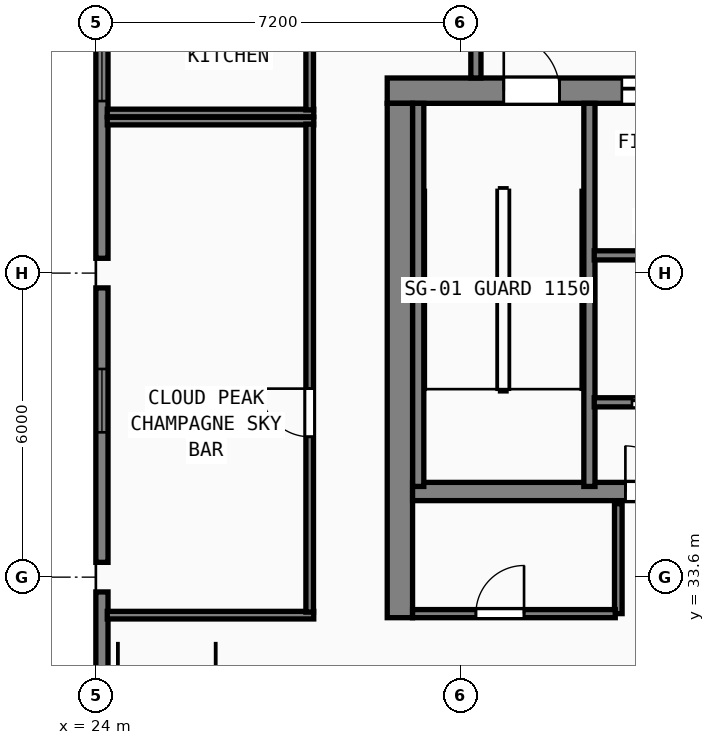
"""IFC4 building model, lengths in metres.
Left out: names, types, materials, properties, quantities, classifications, styles, units other than length and angle.
Written with IfcOpenShell. Run it as: python <this file> out.ifc"""

import sys

from ifc_helpers import new_model, si_unit, direction, frame, frame_2d, origin, origin_2d, place, context, subcontext, project, spatial, rectangle, hollow_rectangle, extrude, element, fill, save


model = new_model("IFC4")
c1 = context("Model", 3, precision=1e-05, world=origin(), true_north=direction((0.0, 1.0)))
c2 = subcontext(c1, "Body", "Model", "MODEL_VIEW")
j1 = project(units=[si_unit("LENGTHUNIT", "METRE"), si_unit("PLANEANGLEUNIT", "RADIAN")], contexts=[c1])
p1 = place(None, origin())
s1 = spatial("IfcSite", under=j1, at=p1, CompositionType="ELEMENT")
p2 = place(p1, origin())
s2 = spatial("IfcBuilding", under=s1, at=p2, CompositionType="ELEMENT")
p3 = place(p2, frame((0.0, 0.0, 323.2)))
s3 = spatial("IfcBuildingStorey", under=s2, at=p3, CompositionType="ELEMENT", Elevation=323.2)
p4 = place(p3, frame((29.75, 43.2, 0.0), z_axis=(0.0, 0.0, 1.0), x_axis=(1.0, 0.0, 0.0)))
e1 = element("IfcWall", 1, at=p4, inside=s3, PredefinedType="SHEAR", context=c2, shape_type="SweptSolid", body=[
    extrude(rectangle(XDim=17.3, YDim=0.5, at=frame_2d((8.65, 0.0))), origin(), (0.0, 0.0, 1.0), 4.75),
])
p5 = place(p4, frame((2.3, 0.0, 0.0)))
e2 = element("IfcOpeningElement", 2, at=p5, cuts=e1, PredefinedType="OPENING", context=c2, shape_type="SweptSolid", body=[
    extrude(rectangle(XDim=1.1, YDim=2.15, at=frame_2d((0.55, 1.075))), frame((0.0, 0.26, 0.0), z_axis=(0.0, -1.0, 0.0), x_axis=(1.0, 0.0, 0.0)), (0.0, 0.0, 1.0), 0.52),
])
p6 = place(p4, frame((7.41, 0.0, 0.0)))
e3 = element("IfcOpeningElement", 3, at=p6, cuts=e1, PredefinedType="OPENING", context=c2, shape_type="SweptSolid", body=[
    extrude(rectangle(XDim=1.1, YDim=2.15, at=frame_2d((0.55, 1.075))), frame((0.0, 0.26, 0.0), z_axis=(0.0, -1.0, 0.0), x_axis=(1.0, 0.0, 0.0)), (0.0, 0.0, 1.0), 0.52),
])
p7 = place(p4, frame((13.5, 0.0, 0.0)))
e4 = element("IfcOpeningElement", 4, at=p7, cuts=e1, PredefinedType="OPENING", context=c2, shape_type="SweptSolid", body=[
    extrude(rectangle(XDim=1.1, YDim=2.15, at=frame_2d((0.55, 1.075))), frame((0.0, 0.26, 0.0), z_axis=(0.0, -1.0, 0.0), x_axis=(1.0, 0.0, 0.0)), (0.0, 0.0, 1.0), 0.52),
])
p8 = place(p4, frame((4.63, 0.0, 0.0)))
e5 = element("IfcOpeningElement", 5, at=p8, cuts=e1, PredefinedType="OPENING", context=c2, shape_type="SweptSolid", body=[
    extrude(rectangle(XDim=1.1, YDim=2.2, at=frame_2d((0.55, 1.1))), frame((0.0, 0.26, 0.0), z_axis=(0.0, -1.0, 0.0), x_axis=(1.0, 0.0, 0.0)), (0.0, 0.0, 1.0), 0.52),
])
p9 = place(p4, frame((10.99, 0.0, 0.0)))
e6 = element("IfcOpeningElement", 6, at=p9, cuts=e1, PredefinedType="OPENING", context=c2, shape_type="SweptSolid", body=[
    extrude(rectangle(XDim=1.1, YDim=2.2, at=frame_2d((0.55, 1.1))), frame((0.0, 0.26, 0.0), z_axis=(0.0, -1.0, 0.0), x_axis=(1.0, 0.0, 0.0)), (0.0, 0.0, 1.0), 0.52),
])
p10 = place(p3, frame((30.0, 32.8, 0.0), z_axis=(0.0, 0.0, 1.0), x_axis=(0.0, 1.0, 0.0)))
e7 = element("IfcWall", 7, at=p10, inside=s3, PredefinedType="SHEAR", context=c2, shape_type="SweptSolid", body=[
    extrude(rectangle(XDim=10.15, YDim=0.5, at=frame_2d((5.075, 0.0))), origin(), (0.0, 0.0, 1.0), 4.75),
])
p11 = place(p3, frame((30.25, 35.29, 0.0), z_axis=(0.0, 0.0, 1.0), x_axis=(1.0, 0.0, 0.0)))
e8 = element("IfcWall", 8, at=p11, inside=s3, PredefinedType="SHEAR", context=c2, shape_type="SweptSolid", body=[
    extrude(rectangle(XDim=16.3, YDim=0.36, at=frame_2d((8.15, 0.0))), origin(), (0.0, 0.0, 1.0), 4.75),
])
p12 = place(p11, frame((5.1, 0.0, 0.0), z_axis=(0.0, 0.0, 1.0), x_axis=(-1.0, 0.0, 0.0)))
e9 = element("IfcOpeningElement", 9, at=p12, cuts=e8, PredefinedType="OPENING", context=c2, shape_type="SweptSolid", body=[
    extrude(rectangle(XDim=0.9, YDim=2.1, at=frame_2d((0.45, 1.05))), frame((0.0, 0.19, 0.0), z_axis=(0.0, -1.0, 0.0), x_axis=(1.0, 0.0, 0.0)), (0.0, 0.0, 1.0), 0.38),
])
p13 = place(p11, frame((12.16, 0.0, 0.0), z_axis=(0.0, 0.0, 1.0), x_axis=(-1.0, 0.0, 0.0)))
e10 = element("IfcOpeningElement", 10, at=p13, cuts=e8, PredefinedType="OPENING", context=c2, shape_type="SweptSolid", body=[
    extrude(rectangle(XDim=0.9, YDim=2.1, at=frame_2d((0.45, 1.05))), frame((0.0, 0.19, 0.0), z_axis=(0.0, -1.0, 0.0), x_axis=(1.0, 0.0, 0.0)), (0.0, 0.0, 1.0), 0.38),
])
for number, where, z_axis, x_axis in (
    (11, (30.362, 35.39, 0.0), (0.0, 0.0, 1.0), (0.0, 1.0, 0.0)),
    (12, (33.74, 35.39, 0.0), (0.0, 0.0, 1.0), (0.0, 1.0, 0.0)),
):
    element("IfcWall", number, at=place(p3, frame(where, z_axis=z_axis, x_axis=x_axis)), inside=s3, PredefinedType="SHEAR", context=c2, shape_type="SweptSolid", body=[
        extrude(rectangle(XDim=7.56, YDim=0.22, at=frame_2d((3.78, 0.0))), origin(), (0.0, 0.0, 1.0), 4.75),
    ])
for number, where, z_axis, x_axis in (
    (13, (24.0, 33.6, 0.0), (0.0, 0.0, 1.0), (1.0, 0.0, 0.0)),
    (14, (24.0, 39.6, 0.0), (0.0, 0.0, 1.0), (1.0, 0.0, 0.0)),
):
    element("IfcColumn", number, at=place(p3, frame(where, z_axis=z_axis, x_axis=x_axis)), inside=s3, PredefinedType="COLUMN", context=c2, shape_type="SweptSolid", body=[
        extrude(hollow_rectangle(XDim=0.6, YDim=0.6, WallThickness=0.024, at=origin_2d()), origin(), (0.0, 0.0, 1.0), 5.0),
    ])
p14 = place(p3, frame((24.12, 45.308, 0.0), z_axis=(0.0, 0.0, 1.0), x_axis=(0.0, -1.0, 0.0)))
e15 = element("IfcWall", 15, at=p14, inside=s3, PredefinedType="SOLIDWALL", context=c2, shape_type="SweptSolid", body=[
    extrude(rectangle(XDim=5.416, YDim=0.24, at=frame_2d((2.708, 0.0))), origin(), (0.0, 0.0, 1.0), 4.75),
])
p15 = place(p14, frame((1.063, 0.0, 0.85)))
e16 = element("IfcOpeningElement", 16, at=p15, cuts=e15, PredefinedType="OPENING", context=c2, shape_type="SweptSolid", body=[
    extrude(rectangle(XDim=1.25, YDim=1.95, at=frame_2d((0.625, 0.975))), frame((0.0, 0.13, 0.0), z_axis=(0.0, -1.0, 0.0), x_axis=(1.0, 0.0, 0.0)), (0.0, 0.0, 1.0), 0.26),
])
p16 = place(p3, frame((24.12, 39.308, 0.0), z_axis=(0.0, 0.0, 1.0), x_axis=(0.0, -1.0, 0.0)))
e17 = element("IfcWall", 17, at=p16, inside=s3, PredefinedType="SOLIDWALL", context=c2, shape_type="SweptSolid", body=[
    extrude(rectangle(XDim=5.416, YDim=0.24, at=frame_2d((2.708, 0.0))), origin(), (0.0, 0.0, 1.0), 4.75),
])
p17 = place(p16, frame((1.6, 0.0, 0.85)))
e18 = element("IfcOpeningElement", 18, at=p17, cuts=e17, PredefinedType="OPENING", context=c2, shape_type="SweptSolid", body=[
    extrude(rectangle(XDim=1.25, YDim=1.95, at=frame_2d((0.625, 0.975))), frame((0.0, 0.13, 0.0), z_axis=(0.0, -1.0, 0.0), x_axis=(1.0, 0.0, 0.0)), (0.0, 0.0, 1.0), 0.26),
])
p18 = place(p3, frame((24.12, 33.308, 0.0), z_axis=(0.0, 0.0, 1.0), x_axis=(0.0, -1.0, 0.0)))
e19 = element("IfcWall", 19, at=p18, inside=s3, PredefinedType="SOLIDWALL", context=c2, shape_type="SweptSolid", body=[
    extrude(rectangle(XDim=5.416, YDim=0.24, at=frame_2d((2.708, 0.0))), origin(), (0.0, 0.0, 1.0), 4.75),
])
p19 = place(p18, frame((1.6, 0.0, 0.85)))
e20 = element("IfcOpeningElement", 20, at=p19, cuts=e19, PredefinedType="OPENING", context=c2, shape_type="SweptSolid", body=[
    extrude(rectangle(XDim=1.25, YDim=1.95, at=frame_2d((0.625, 0.975))), frame((0.0, 0.13, 0.0), z_axis=(0.0, -1.0, 0.0), x_axis=(1.0, 0.0, 0.0)), (0.0, 0.0, 1.0), 0.26),
])
p20 = place(p3, frame((31.5, 43.45, 0.0), z_axis=(0.0, 0.0, 1.0), x_axis=(0.0, 1.0, 0.0)))
e21 = element("IfcWall", 21, at=p20, inside=s3, PredefinedType="SOLIDWALL", context=c2, shape_type="SweptSolid", body=[
    extrude(rectangle(XDim=2.445, YDim=0.2, at=frame_2d((1.223, 0.0))), origin(), (0.0, 0.0, 1.0), 4.75),
])
p21 = place(p20, frame((1.8, 0.0, 0.0), z_axis=(0.0, 0.0, 1.0), x_axis=(-1.0, 0.0, 0.0)))
e22 = element("IfcOpeningElement", 22, at=p21, cuts=e21, PredefinedType="OPENING", context=c2, shape_type="SweptSolid", body=[
    extrude(rectangle(XDim=1.1, YDim=2.15, at=frame_2d((0.55, 1.075))), frame((0.0, 0.11, 0.0), z_axis=(0.0, -1.0, 0.0), x_axis=(1.0, 0.0, 0.0)), (0.0, 0.0, 1.0), 0.22),
])
p22 = place(p3, frame((33.835, 39.95, 0.0), z_axis=(0.0, 0.0, 1.0), x_axis=(1.0, 0.0, 0.0)))
e23 = element("IfcWall", 23, at=p22, inside=s3, PredefinedType="SOLIDWALL", context=c2, shape_type="SweptSolid", body=[
    extrude(rectangle(XDim=2.77, YDim=0.18, at=frame_2d((1.385, 0.0))), origin(), (0.0, 0.0, 1.0), 4.75),
])
p23 = place(p3, frame((33.835, 37.05, 0.0), z_axis=(0.0, 0.0, 1.0), x_axis=(1.0, 0.0, 0.0)))
e24 = element("IfcWall", 24, at=p23, inside=s3, PredefinedType="SOLIDWALL", context=c2, shape_type="SweptSolid", body=[
    extrude(rectangle(XDim=2.77, YDim=0.18, at=frame_2d((1.385, 0.0))), origin(), (0.0, 0.0, 1.0), 4.75),
])
p24 = place(p23, frame((1.945, 0.0, 0.0), z_axis=(0.0, 0.0, 1.0), x_axis=(-1.0, 0.0, 0.0)))
e25 = element("IfcOpeningElement", 25, at=p24, cuts=e24, PredefinedType="OPENING", context=c2, shape_type="SweptSolid", body=[
    extrude(rectangle(XDim=1.2, YDim=2.2, at=frame_2d((0.6, 1.1))), frame((0.0, 0.1, 0.0), z_axis=(0.0, -1.0, 0.0), x_axis=(1.0, 0.0, 0.0)), (0.0, 0.0, 1.0), 0.2),
])
p25 = place(p3, frame((34.31, 32.88, 0.0), z_axis=(0.0, 0.0, 1.0), x_axis=(0.0, 1.0, 0.0)))
e26 = element("IfcWall", 26, at=p25, inside=s3, PredefinedType="SOLIDWALL", context=c2, shape_type="SweptSolid", body=[
    extrude(rectangle(XDim=2.17, YDim=0.15, at=frame_2d((1.085, 0.0))), origin(), (0.0, 0.0, 1.0), 4.75),
])
p26 = place(p3, frame((30.25, 32.88, 0.0), z_axis=(0.0, 0.0, 1.0), x_axis=(1.0, 0.0, 0.0)))
e27 = element("IfcWall", 27, at=p26, inside=s3, PredefinedType="SOLIDWALL", context=c2, shape_type="SweptSolid", body=[
    extrude(rectangle(XDim=4.0, YDim=0.16, at=frame_2d((2.0, 0.0))), origin(), (0.0, 0.0, 1.0), 4.75),
])
p27 = place(p26, frame((2.2, 0.0, 0.0), z_axis=(0.0, 0.0, 1.0), x_axis=(-1.0, 0.0, 0.0)))
e28 = element("IfcOpeningElement", 28, at=p27, cuts=e27, PredefinedType="OPENING", context=c2, shape_type="SweptSolid", body=[
    extrude(rectangle(XDim=0.95, YDim=2.12, at=frame_2d((0.475, 1.06))), frame((0.0, 0.09, 0.0), z_axis=(0.0, -1.0, 0.0), x_axis=(1.0, 0.0, 0.0)), (0.0, 0.0, 1.0), 0.18),
])
for number, where, z_axis, x_axis in (
    (29, (24.225, 42.6, 0.0), (0.0, 0.0, 1.0), (1.0, 0.0, 0.0)),
    (30, (24.225, 32.85, 0.0), (0.0, 0.0, 1.0), (1.0, 0.0, 0.0)),
):
    element("IfcWall", number, at=place(p3, frame(where, z_axis=z_axis, x_axis=x_axis)), inside=s3, PredefinedType="PARTITIONING", context=c2, shape_type="SweptSolid", body=[
        extrude(rectangle(XDim=4.075, YDim=0.15, at=frame_2d((2.038, 0.0))), origin(), (0.0, 0.0, 1.0), 4.75),
    ])
p28 = place(p3, frame((28.22, 32.91, 0.0), z_axis=(0.0, 0.0, 1.0), x_axis=(0.0, 1.0, 0.0)))
e31 = element("IfcWall", 31, at=p28, inside=s3, PredefinedType="PARTITIONING", context=c2, shape_type="SweptSolid", body=[
    extrude(rectangle(XDim=9.63, YDim=0.15, at=frame_2d((4.815, 0.0))), origin(), (0.0, 0.0, 1.0), 4.75),
])
p29 = place(p28, frame((4.41, 0.0, 0.0), z_axis=(0.0, 0.0, 1.0), x_axis=(-1.0, 0.0, 0.0)))
e32 = element("IfcOpeningElement", 32, at=p29, cuts=e31, PredefinedType="OPENING", context=c2, shape_type="SweptSolid", body=[
    extrude(rectangle(XDim=0.95, YDim=2.12, at=frame_2d((0.475, 1.06))), frame((0.0, 0.085, 0.0), z_axis=(0.0, -1.0, 0.0), x_axis=(1.0, 0.0, 0.0)), (0.0, 0.0, 1.0), 0.17),
])
p30 = place(p3, frame((24.225, 42.76, 0.0), z_axis=(0.0, 0.0, 1.0), x_axis=(1.0, 0.0, 0.0)))
e33 = element("IfcWall", 33, at=p30, inside=s3, PredefinedType="PARTITIONING", context=c2, shape_type="SweptSolid", body=[
    extrude(rectangle(XDim=4.075, YDim=0.15, at=frame_2d((2.038, 0.0))), origin(), (0.0, 0.0, 1.0), 4.75),
])
p31 = place(p3, frame((28.22, 42.82, 0.0), z_axis=(0.0, 0.0, 1.0), x_axis=(0.0, 1.0, 0.0)))
e34 = element("IfcWall", 34, at=p31, inside=s3, PredefinedType="PARTITIONING", context=c2, shape_type="SweptSolid", body=[
    extrude(rectangle(XDim=4.78, YDim=0.15, at=frame_2d((2.39, 0.0))), origin(), (0.0, 0.0, 1.0), 4.75),
])
p32 = place(p31, frame((2.61, 0.0, 0.0), z_axis=(0.0, 0.0, 1.0), x_axis=(-1.0, 0.0, 0.0)))
e35 = element("IfcOpeningElement", 35, at=p32, cuts=e34, PredefinedType="OPENING", context=c2, shape_type="SweptSolid", body=[
    extrude(rectangle(XDim=0.95, YDim=2.12, at=frame_2d((0.475, 1.06))), frame((0.0, 0.085, 0.0), z_axis=(0.0, -1.0, 0.0), x_axis=(1.0, 0.0, 0.0)), (0.0, 0.0, 1.0), 0.17),
])
p33 = place(p15, origin())
e36 = element("IfcWindow", 36, at=p33, inside=s3, PartitioningType="SINGLE_PANEL", PredefinedType="WINDOW", context=c2, shape_type="SweptSolid", body=[
    extrude(rectangle(XDim=1.25, YDim=1.95, at=frame_2d((0.625, 0.975))), frame((0.0, 0.03, 0.0), z_axis=(0.0, -1.0, 0.0), x_axis=(1.0, 0.0, 0.0)), (0.0, 0.0, 1.0), 0.06),
])
fill(e16, e36)
p34 = place(p17, origin())
e37 = element("IfcWindow", 37, at=p34, inside=s3, PartitioningType="SINGLE_PANEL", PredefinedType="WINDOW", context=c2, shape_type="SweptSolid", body=[
    extrude(rectangle(XDim=1.25, YDim=1.95, at=frame_2d((0.625, 0.975))), frame((0.0, 0.03, 0.0), z_axis=(0.0, -1.0, 0.0), x_axis=(1.0, 0.0, 0.0)), (0.0, 0.0, 1.0), 0.06),
])
fill(e18, e37)
p35 = place(p5, origin())
e38 = element("IfcDoor", 38, at=p35, inside=s3, OperationType="SINGLE_SWING_LEFT", PredefinedType="DOOR", context=c2, shape_type="SweptSolid", body=[
    extrude(rectangle(XDim=1.1, YDim=2.15, at=frame_2d((0.55, 1.075))), frame((0.0, 0.185, 0.0), z_axis=(0.0, -1.0, 0.0), x_axis=(1.0, 0.0, 0.0)), (0.0, 0.0, 1.0), 0.05),
])
fill(e2, e38)
p36 = place(p8, origin())
e39 = element("IfcDoor", 39, at=p36, inside=s3, OperationType="SLIDING_TO_LEFT", PredefinedType="DOOR", context=c2, shape_type="SweptSolid", body=[
    extrude(rectangle(XDim=1.1, YDim=2.2, at=frame_2d((0.55, 1.1))), frame((0.0, 0.185, 0.0), z_axis=(0.0, -1.0, 0.0), x_axis=(1.0, 0.0, 0.0)), (0.0, 0.0, 1.0), 0.05),
])
fill(e5, e39)
p37 = place(p24, origin())
e40 = element("IfcDoor", 40, at=p37, inside=s3, OperationType="SLIDING_TO_RIGHT", PredefinedType="DOOR", context=c2, shape_type="SweptSolid", body=[
    extrude(rectangle(XDim=1.2, YDim=2.2, at=frame_2d((0.6, 1.1))), frame((0.0, 0.025, 0.0), z_axis=(0.0, -1.0, 0.0), x_axis=(1.0, 0.0, 0.0)), (0.0, 0.0, 1.0), 0.05),
])
fill(e25, e40)
p38 = place(p12, origin())
e41 = element("IfcDoor", 41, at=p38, inside=s3, OperationType="SINGLE_SWING_RIGHT", PredefinedType="DOOR", context=c2, shape_type="SweptSolid", body=[
    extrude(rectangle(XDim=0.9, YDim=2.1, at=frame_2d((0.45, 1.05))), frame((0.0, 0.025, 0.0), z_axis=(0.0, -1.0, 0.0), x_axis=(1.0, 0.0, 0.0)), (0.0, 0.0, 1.0), 0.05),
])
fill(e9, e41)
p39 = place(p27, origin())
e42 = element("IfcDoor", 42, at=p39, inside=s3, OperationType="SINGLE_SWING_LEFT", PredefinedType="DOOR", context=c2, shape_type="SweptSolid", body=[
    extrude(rectangle(XDim=0.95, YDim=2.12, at=frame_2d((0.475, 1.06))), frame((0.0, 0.025, 0.0), z_axis=(0.0, -1.0, 0.0), x_axis=(1.0, 0.0, 0.0)), (0.0, 0.0, 1.0), 0.05),
])
fill(e28, e42)
p40 = place(p29, origin())
e43 = element("IfcDoor", 43, at=p40, inside=s3, OperationType="SINGLE_SWING_LEFT", PredefinedType="DOOR", context=c2, shape_type="SweptSolid", body=[
    extrude(rectangle(XDim=0.95, YDim=2.12, at=frame_2d((0.475, 1.06))), frame((0.0, 0.025, 0.0), z_axis=(0.0, -1.0, 0.0), x_axis=(1.0, 0.0, 0.0)), (0.0, 0.0, 1.0), 0.05),
])
fill(e32, e43)
save(model, sys.argv[1])
